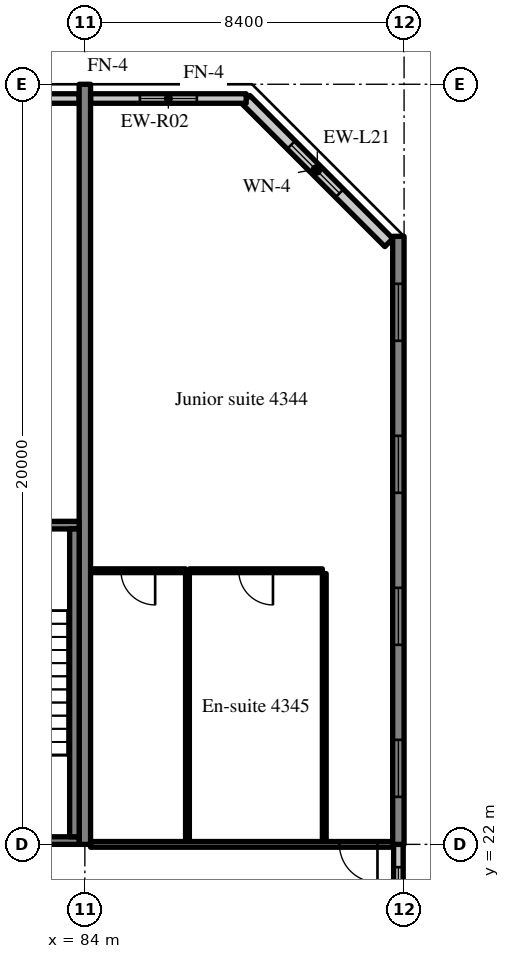
"""IFC4 building model, lengths in metres.
Left out: names, types, materials, properties, quantities, classifications, styles, units other than length and angle.
Written with IfcOpenShell. Run it as: python <this file> out.ifc"""

import sys

from ifc_helpers import new_model, si_unit, direction, frame, frame_2d, origin, place, context, subcontext, project, spatial, rectangle, extrude, source, transform, mapped, element, fill, save


model = new_model("IFC4")
c1 = context("Model", 3, precision=1e-05, world=origin(), true_north=direction((0.0, 1.0)))
c2 = subcontext(c1, "Body", "Model", "MODEL_VIEW")
j1 = project(units=[si_unit("LENGTHUNIT", "METRE"), si_unit("PLANEANGLEUNIT", "RADIAN")], contexts=[c1])
p1 = place(None, origin())
s1 = spatial("IfcSite", under=j1, at=p1, CompositionType="ELEMENT")
p2 = place(p1, origin())
s2 = spatial("IfcBuilding", under=s1, at=p2, CompositionType="ELEMENT")
p3 = place(p2, frame((0.0, 0.0, 178.2)))
s3 = spatial("IfcBuildingStorey", under=s2, at=p3, CompositionType="ELEMENT", Elevation=178.2)
m1 = source(origin(), c2, "Body", "SweptSolid", [
    extrude(rectangle(XDim=20.0, YDim=0.3, at=frame_2d((10.0, 0.0))), origin(), (0.0, 0.0, 1.0), 3.52),
])
p4 = place(p3, frame((84.0, 22.0, 0.0), z_axis=(0.0, 0.0, 1.0), x_axis=(0.0, 1.0, 0.0)))
e1 = element("IfcWall", 1, at=p4, inside=s3, PredefinedType="SHEAR", context=c2, shape_type="MappedRepresentation", body=[
    mapped(m1, transform((0.0, 0.0, 0.0), scale=1.0)),
])
m2 = source(origin(), c2, "Body", "SweptSolid", [
    extrude(rectangle(XDim=16.0, YDim=0.3, at=frame_2d((8.0, 0.0))), origin(), (0.0, 0.0, 1.0), 3.52),
])
p5 = place(p3, frame((92.25, 22.0, 0.0), z_axis=(0.0, 0.0, 1.0), x_axis=(0.0, 1.0, 0.0)))
e2 = element("IfcWall", 2, at=p5, inside=s3, PredefinedType="SHEAR", context=c2, shape_type="MappedRepresentation", body=[
    mapped(m2, transform((0.0, 0.0, 0.0), scale=1.0)),
])
m3 = source(origin(), c2, "Body", "SweptSolid", [
    extrude(rectangle(XDim=1.5, YDim=1.5, at=frame_2d((0.75, 0.75))), frame((0.0, 0.16, 0.0), z_axis=(0.0, -1.0, 0.0), x_axis=(1.0, 0.0, 0.0)), (0.0, 0.0, 1.0), 0.32),
])
p6 = place(p5, frame((1.25, 0.0, 0.9)))
e3 = element("IfcOpeningElement", 3, at=p6, cuts=e2, PredefinedType="OPENING", context=c2, shape_type="MappedRepresentation", body=[
    mapped(m3, transform((0.0, 0.0, 0.0), scale=1.0)),
])
p7 = place(p5, frame((5.25, 0.0, 0.9)))
e4 = element("IfcOpeningElement", 4, at=p7, cuts=e2, PredefinedType="OPENING", context=c2, shape_type="MappedRepresentation", body=[
    mapped(m3, transform((0.0, 0.0, 0.0), scale=1.0)),
])
p8 = place(p5, frame((9.25, 0.0, 0.9)))
e5 = element("IfcOpeningElement", 5, at=p8, cuts=e2, PredefinedType="OPENING", context=c2, shape_type="MappedRepresentation", body=[
    mapped(m3, transform((0.0, 0.0, 0.0), scale=1.0)),
])
p9 = place(p5, frame((13.25, 0.0, 0.9)))
e6 = element("IfcOpeningElement", 6, at=p9, cuts=e2, PredefinedType="OPENING", context=c2, shape_type="MappedRepresentation", body=[
    mapped(m3, transform((0.0, 0.0, 0.0), scale=1.0)),
])
m4 = source(origin(), c2, "Body", "SweptSolid", [
    extrude(rectangle(XDim=5.326, YDim=0.3, at=frame_2d((2.663, 0.0))), origin(), (0.0, 0.0, 1.0), 3.52),
])
p10 = place(p3, frame((92.0, 37.834, 0.0), z_axis=(0.0, 0.0, 1.0), x_axis=(-0.707083859269, 0.707129702361, 0.0)))
e7 = element("IfcWall", 7, at=p10, inside=s3, PredefinedType="SOLIDWALL", context=c2, shape_type="MappedRepresentation", body=[
    mapped(m4, transform((0.0, 0.0, 0.0), scale=1.0)),
])
m5 = source(origin(), c2, "Body", "SweptSolid", [
    extrude(rectangle(XDim=1.8, YDim=1.5, at=frame_2d((0.9, 0.75))), frame((0.0, 0.16, 0.0), z_axis=(0.0, -1.0, 0.0), x_axis=(1.0, 0.0, 0.0)), (0.0, 0.0, 1.0), 0.32),
])
p11 = place(p10, frame((1.836, 0.0, 0.9)))
e8 = element("IfcOpeningElement", 8, at=p11, cuts=e7, PredefinedType="OPENING", context=c2, shape_type="MappedRepresentation", body=[
    mapped(m5, transform((0.0, 0.0, 0.0), scale=1.0)),
])
m6 = source(origin(), c2, "Body", "SweptSolid", [
    extrude(rectangle(XDim=1.708, YDim=0.25, at=frame_2d((0.854, 0.0))), origin(), (0.0, 0.0, 1.0), 2.87),
])
p12 = place(p3, frame((83.85, 41.625, 0.0), z_axis=(0.0, 0.0, 1.0), x_axis=(-1.0, 0.0, 0.0)))
e9 = element("IfcWall", 9, at=p12, inside=s3, PredefinedType="SOLIDWALL", context=c2, shape_type="MappedRepresentation", body=[
    mapped(m6, transform((0.0, 0.0, 0.0), scale=1.0)),
])
m7 = source(origin(), c2, "Body", "SweptSolid", [
    extrude(rectangle(XDim=4.095, YDim=0.25, at=frame_2d((2.047, 0.0))), origin(), (0.0, 0.0, 1.0), 2.87),
])
p13 = place(p3, frame((88.245, 41.625, 0.0), z_axis=(0.0, 0.0, 1.0), x_axis=(-1.0, 0.0, 0.0)))
e10 = element("IfcWall", 10, at=p13, inside=s3, PredefinedType="SOLIDWALL", context=c2, shape_type="MappedRepresentation", body=[
    mapped(m7, transform((0.0, 0.0, 0.0), scale=1.0)),
])
m8 = source(origin(), c2, "Body", "SweptSolid", [
    extrude(rectangle(XDim=1.5, YDim=1.5, at=frame_2d((0.75, 0.75))), frame((0.0, 0.135, 0.0), z_axis=(0.0, -1.0, 0.0), x_axis=(1.0, 0.0, 0.0)), (0.0, 0.0, 1.0), 0.27),
])
p14 = place(p13, frame((1.297, 0.0, 0.9)))
e11 = element("IfcOpeningElement", 11, at=p14, cuts=e10, PredefinedType="OPENING", context=c2, shape_type="MappedRepresentation", body=[
    mapped(m8, transform((0.0, 0.0, 0.0), scale=1.0)),
])
m9 = source(origin(), c2, "Body", "SweptSolid", [
    extrude(rectangle(XDim=2.4, YDim=0.25, at=frame_2d((1.2, 0.0))), origin(), (0.0, 0.0, 1.0), 2.62),
])
p15 = place(p3, frame((92.25, 19.6, 0.0), z_axis=(0.0, 0.0, 1.0), x_axis=(0.0, 1.0, 0.0)))
e12 = element("IfcWall", 12, at=p15, inside=s3, PredefinedType="SOLIDWALL", context=c2, shape_type="MappedRepresentation", body=[
    mapped(m9, transform((0.0, 0.0, 0.0), scale=1.0)),
])
m10 = source(origin(), c2, "Body", "SweptSolid", [
    extrude(rectangle(XDim=1.2, YDim=1.5, at=frame_2d((0.6, 0.75))), frame((0.0, 0.135, 0.0), z_axis=(0.0, -1.0, 0.0), x_axis=(1.0, 0.0, 0.0)), (0.0, 0.0, 1.0), 0.27),
])
p16 = place(p15, frame((0.6, 0.0, 0.9)))
e13 = element("IfcOpeningElement", 13, at=p16, cuts=e12, PredefinedType="OPENING", context=c2, shape_type="MappedRepresentation", body=[
    mapped(m10, transform((0.0, 0.0, 0.0), scale=1.0)),
])
m11 = source(origin(), c2, "Body", "SweptSolid", [
    extrude(rectangle(XDim=8.25, YDim=0.2, at=frame_2d((4.125, 0.0))), origin(), (0.0, 0.0, 1.0), 3.52),
])
p17 = place(p3, frame((83.85, 22.1, 0.0), z_axis=(0.0, 0.0, 1.0), x_axis=(-1.0, 0.0, 0.0)))
e14 = element("IfcWall", 14, at=p17, inside=s3, PredefinedType="SOLIDWALL", context=c2, shape_type="MappedRepresentation", body=[
    mapped(m11, transform((0.0, 0.0, 0.0), scale=1.0)),
])
m12 = source(origin(), c2, "Body", "SweptSolid", [
    extrude(rectangle(XDim=1.2, YDim=2.1, at=frame_2d((0.6, 1.05))), frame((0.0, 0.11, 0.0), z_axis=(0.0, -1.0, 0.0), x_axis=(1.0, 0.0, 0.0)), (0.0, 0.0, 1.0), 0.22),
])
p18 = place(p17, frame((6.05, 0.0, 0.0)))
e15 = element("IfcOpeningElement", 15, at=p18, cuts=e14, PredefinedType="OPENING", context=c2, shape_type="MappedRepresentation", body=[
    mapped(m12, transform((0.0, 0.0, 0.0), scale=1.0)),
])
p19 = place(p3, frame((83.85, 30.4, 0.0), z_axis=(0.0, 0.0, 1.0), x_axis=(-1.0, 0.0, 0.0)))
e16 = element("IfcWall", 16, at=p19, inside=s3, PredefinedType="SOLIDWALL", context=c2, shape_type="MappedRepresentation", body=[
    mapped(m11, transform((0.0, 0.0, 0.0), scale=1.0)),
])
m13 = source(origin(), c2, "Body", "SweptSolid", [
    extrude(rectangle(XDim=1.0, YDim=2.1, at=frame_2d((0.5, 1.05))), frame((0.0, 0.11, 0.0), z_axis=(0.0, -1.0, 0.0), x_axis=(1.0, 0.0, 0.0)), (0.0, 0.0, 1.0), 0.22),
])
p20 = place(p19, frame((6.15, 0.0, 0.0)))
e17 = element("IfcOpeningElement", 17, at=p20, cuts=e16, PredefinedType="OPENING", context=c2, shape_type="MappedRepresentation", body=[
    mapped(m13, transform((0.0, 0.0, 0.0), scale=1.0)),
])
m14 = source(origin(), c2, "Body", "SweptSolid", [
    extrude(rectangle(XDim=8.1, YDim=0.25, at=frame_2d((4.05, 0.0))), origin(), (0.0, 0.0, 1.0), 3.52),
])
p21 = place(p3, frame((83.725, 22.2, 0.0), z_axis=(0.0, 0.0, 1.0), x_axis=(0.0, 1.0, 0.0)))
e18 = element("IfcWall", 18, at=p21, inside=s3, PredefinedType="SOLIDWALL", context=c2, shape_type="MappedRepresentation", body=[
    mapped(m14, transform((0.0, 0.0, 0.0), scale=1.0)),
])
m15 = source(origin(), c2, "Body", "SweptSolid", [
    extrude(rectangle(XDim=7.05, YDim=0.1, at=frame_2d((3.525, 0.0))), origin(), (0.0, 0.0, 1.0), 3.52),
])
for number, where, z_axis, x_axis in (
    (19, (90.3, 22.075, 0.0), (0.0, 0.0, 1.0), (0.0, 1.0, 0.0)),
    (20, (86.7, 22.075, 0.0), (0.0, 0.0, 1.0), (0.0, 1.0, 0.0)),
):
    element("IfcWall", number, at=place(p3, frame(where, z_axis=z_axis, x_axis=x_axis)), inside=s3, PredefinedType="PARTITIONING", context=c2, shape_type="MappedRepresentation", body=[
        mapped(m15, transform((0.0, 0.0, 0.0), scale=1.0)),
    ])
m16 = source(origin(), c2, "Body", "SweptSolid", [
    extrude(rectangle(XDim=3.5, YDim=0.1, at=frame_2d((1.75, 0.0))), origin(), (0.0, 0.0, 1.0), 3.52),
])
p22 = place(p3, frame((86.75, 29.2, 0.0), z_axis=(0.0, 0.0, 1.0), x_axis=(1.0, 0.0, 0.0)))
e21 = element("IfcWall", 21, at=p22, inside=s3, PredefinedType="PARTITIONING", context=c2, shape_type="MappedRepresentation", body=[
    mapped(m16, transform((0.0, 0.0, 0.0), scale=1.0)),
])
m17 = source(origin(), c2, "Body", "SweptSolid", [
    extrude(rectangle(XDim=0.9, YDim=2.1, at=frame_2d((0.45, 1.05))), frame((0.0, 0.06, 0.0), z_axis=(0.0, -1.0, 0.0), x_axis=(1.0, 0.0, 0.0)), (0.0, 0.0, 1.0), 0.12),
])
p23 = place(p22, frame((1.3, 0.0, 0.0)))
e22 = element("IfcOpeningElement", 22, at=p23, cuts=e21, PredefinedType="OPENING", context=c2, shape_type="MappedRepresentation", body=[
    mapped(m17, transform((0.0, 0.0, 0.0), scale=1.0)),
])
m18 = source(origin(), c2, "Body", "SweptSolid", [
    extrude(rectangle(XDim=2.5, YDim=0.1, at=frame_2d((1.25, 0.0))), origin(), (0.0, 0.0, 1.0), 3.52),
])
p24 = place(p3, frame((84.15, 29.2, 0.0), z_axis=(0.0, 0.0, 1.0), x_axis=(1.0, 0.0, 0.0)))
e23 = element("IfcWall", 23, at=p24, inside=s3, PredefinedType="PARTITIONING", context=c2, shape_type="MappedRepresentation", body=[
    mapped(m18, transform((0.0, 0.0, 0.0), scale=1.0)),
])
p25 = place(p24, frame((0.8, 0.0, 0.0)))
e24 = element("IfcOpeningElement", 24, at=p25, cuts=e23, PredefinedType="OPENING", context=c2, shape_type="MappedRepresentation", body=[
    mapped(m17, transform((0.0, 0.0, 0.0), scale=1.0)),
])
m19 = source(origin(), c2, "Body", "SweptSolid", [
    extrude(rectangle(XDim=7.95, YDim=0.15, at=frame_2d((3.975, 0.0))), origin(), (0.0, 0.0, 1.0), 2.82),
])
p26 = place(p3, frame((84.15, 22.0, 0.0), z_axis=(0.0, 0.0, 1.0), x_axis=(1.0, 0.0, 0.0)))
e25 = element("IfcWall", 25, at=p26, inside=s3, PredefinedType="PARTITIONING", context=c2, shape_type="MappedRepresentation", body=[
    mapped(m19, transform((0.0, 0.0, 0.0), scale=1.0)),
])
m20 = source(origin(), c2, "Body", "SweptSolid", [
    extrude(rectangle(XDim=1.0, YDim=2.1, at=frame_2d((0.5, 1.05))), frame((0.0, 0.085, 0.0), z_axis=(0.0, -1.0, 0.0), x_axis=(1.0, 0.0, 0.0)), (0.0, 0.0, 1.0), 0.17),
])
p27 = place(p26, frame((6.55, 0.0, 0.0)))
e26 = element("IfcOpeningElement", 26, at=p27, cuts=e25, PredefinedType="OPENING", context=c2, shape_type="MappedRepresentation", body=[
    mapped(m20, transform((0.0, 0.0, 0.0), scale=1.0)),
])
m21 = source(origin(), c2, "Body", "SweptSolid", [
    extrude(rectangle(XDim=1.8, YDim=1.5, at=frame_2d((0.9, 0.75))), frame((0.0, 0.03, 0.0), z_axis=(0.0, -1.0, 0.0), x_axis=(1.0, 0.0, 0.0)), (0.0, 0.0, 1.0), 0.06),
])
p28 = place(p11, origin())
e27 = element("IfcWindow", 27, at=p28, inside=s3, PartitioningType="SINGLE_PANEL", PredefinedType="WINDOW", context=c2, shape_type="MappedRepresentation", body=[
    mapped(m21, transform((0.0, 0.0, 0.0), scale=1.0)),
])
fill(e8, e27)
m22 = source(origin(), c2, "Body", "SweptSolid", [
    extrude(rectangle(XDim=1.5, YDim=1.5, at=frame_2d((0.75, 0.75))), frame((0.0, 0.03, 0.0), z_axis=(0.0, -1.0, 0.0), x_axis=(1.0, 0.0, 0.0)), (0.0, 0.0, 1.0), 0.06),
])
p29 = place(p14, origin())
e28 = element("IfcWindow", 28, at=p29, inside=s3, PartitioningType="SINGLE_PANEL", PredefinedType="WINDOW", context=c2, shape_type="MappedRepresentation", body=[
    mapped(m22, transform((0.0, 0.0, 0.0), scale=1.0)),
])
fill(e11, e28)
p30 = place(p6, origin())
e29 = element("IfcWindow", 29, at=p30, inside=s3, PartitioningType="SINGLE_PANEL", PredefinedType="WINDOW", context=c2, shape_type="MappedRepresentation", body=[
    mapped(m22, transform((0.0, 0.0, 0.0), scale=1.0)),
])
fill(e3, e29)
p31 = place(p7, origin())
e30 = element("IfcWindow", 30, at=p31, inside=s3, PartitioningType="SINGLE_PANEL", PredefinedType="WINDOW", context=c2, shape_type="MappedRepresentation", body=[
    mapped(m22, transform((0.0, 0.0, 0.0), scale=1.0)),
])
fill(e4, e30)
p32 = place(p8, origin())
e31 = element("IfcWindow", 31, at=p32, inside=s3, PartitioningType="SINGLE_PANEL", PredefinedType="WINDOW", context=c2, shape_type="MappedRepresentation", body=[
    mapped(m22, transform((0.0, 0.0, 0.0), scale=1.0)),
])
fill(e5, e31)
p33 = place(p9, origin())
e32 = element("IfcWindow", 32, at=p33, inside=s3, PartitioningType="SINGLE_PANEL", PredefinedType="WINDOW", context=c2, shape_type="MappedRepresentation", body=[
    mapped(m22, transform((0.0, 0.0, 0.0), scale=1.0)),
])
fill(e6, e32)
m23 = source(origin(), c2, "Body", "SweptSolid", [
    extrude(rectangle(XDim=1.2, YDim=1.5, at=frame_2d((0.6, 0.75))), frame((0.0, 0.03, 0.0), z_axis=(0.0, -1.0, 0.0), x_axis=(1.0, 0.0, 0.0)), (0.0, 0.0, 1.0), 0.06),
])
p34 = place(p16, origin())
e33 = element("IfcWindow", 33, at=p34, inside=s3, PartitioningType="SINGLE_PANEL", PredefinedType="WINDOW", context=c2, shape_type="MappedRepresentation", body=[
    mapped(m23, transform((0.0, 0.0, 0.0), scale=1.0)),
])
fill(e13, e33)
m24 = source(origin(), c2, "Body", "SweptSolid", [
    extrude(rectangle(XDim=0.9, YDim=2.1, at=frame_2d((0.45, 1.05))), frame((0.0, 0.025, 0.0), z_axis=(0.0, -1.0, 0.0), x_axis=(1.0, 0.0, 0.0)), (0.0, 0.0, 1.0), 0.05),
])
p35 = place(p23, origin())
e34 = element("IfcDoor", 34, at=p35, inside=s3, OperationType="SINGLE_SWING_RIGHT", PredefinedType="DOOR", context=c2, shape_type="MappedRepresentation", body=[
    mapped(m24, transform((0.0, 0.0, 0.0), scale=1.0)),
])
fill(e22, e34)
p36 = place(p25, origin())
e35 = element("IfcDoor", 35, at=p36, inside=s3, OperationType="SINGLE_SWING_RIGHT", PredefinedType="DOOR", context=c2, shape_type="MappedRepresentation", body=[
    mapped(m24, transform((0.0, 0.0, 0.0), scale=1.0)),
])
fill(e24, e35)
m25 = source(origin(), c2, "Body", "SweptSolid", [
    extrude(rectangle(XDim=1.0, YDim=2.1, at=frame_2d((0.5, 1.05))), frame((0.0, 0.025, 0.0), z_axis=(0.0, -1.0, 0.0), x_axis=(1.0, 0.0, 0.0)), (0.0, 0.0, 1.0), 0.05),
])
p37 = place(p27, origin())
e36 = element("IfcDoor", 36, at=p37, inside=s3, OperationType="SINGLE_SWING_RIGHT", PredefinedType="DOOR", context=c2, shape_type="MappedRepresentation", body=[
    mapped(m25, transform((0.0, 0.0, 0.0), scale=1.0)),
])
fill(e26, e36)
save(model, sys.argv[1])
